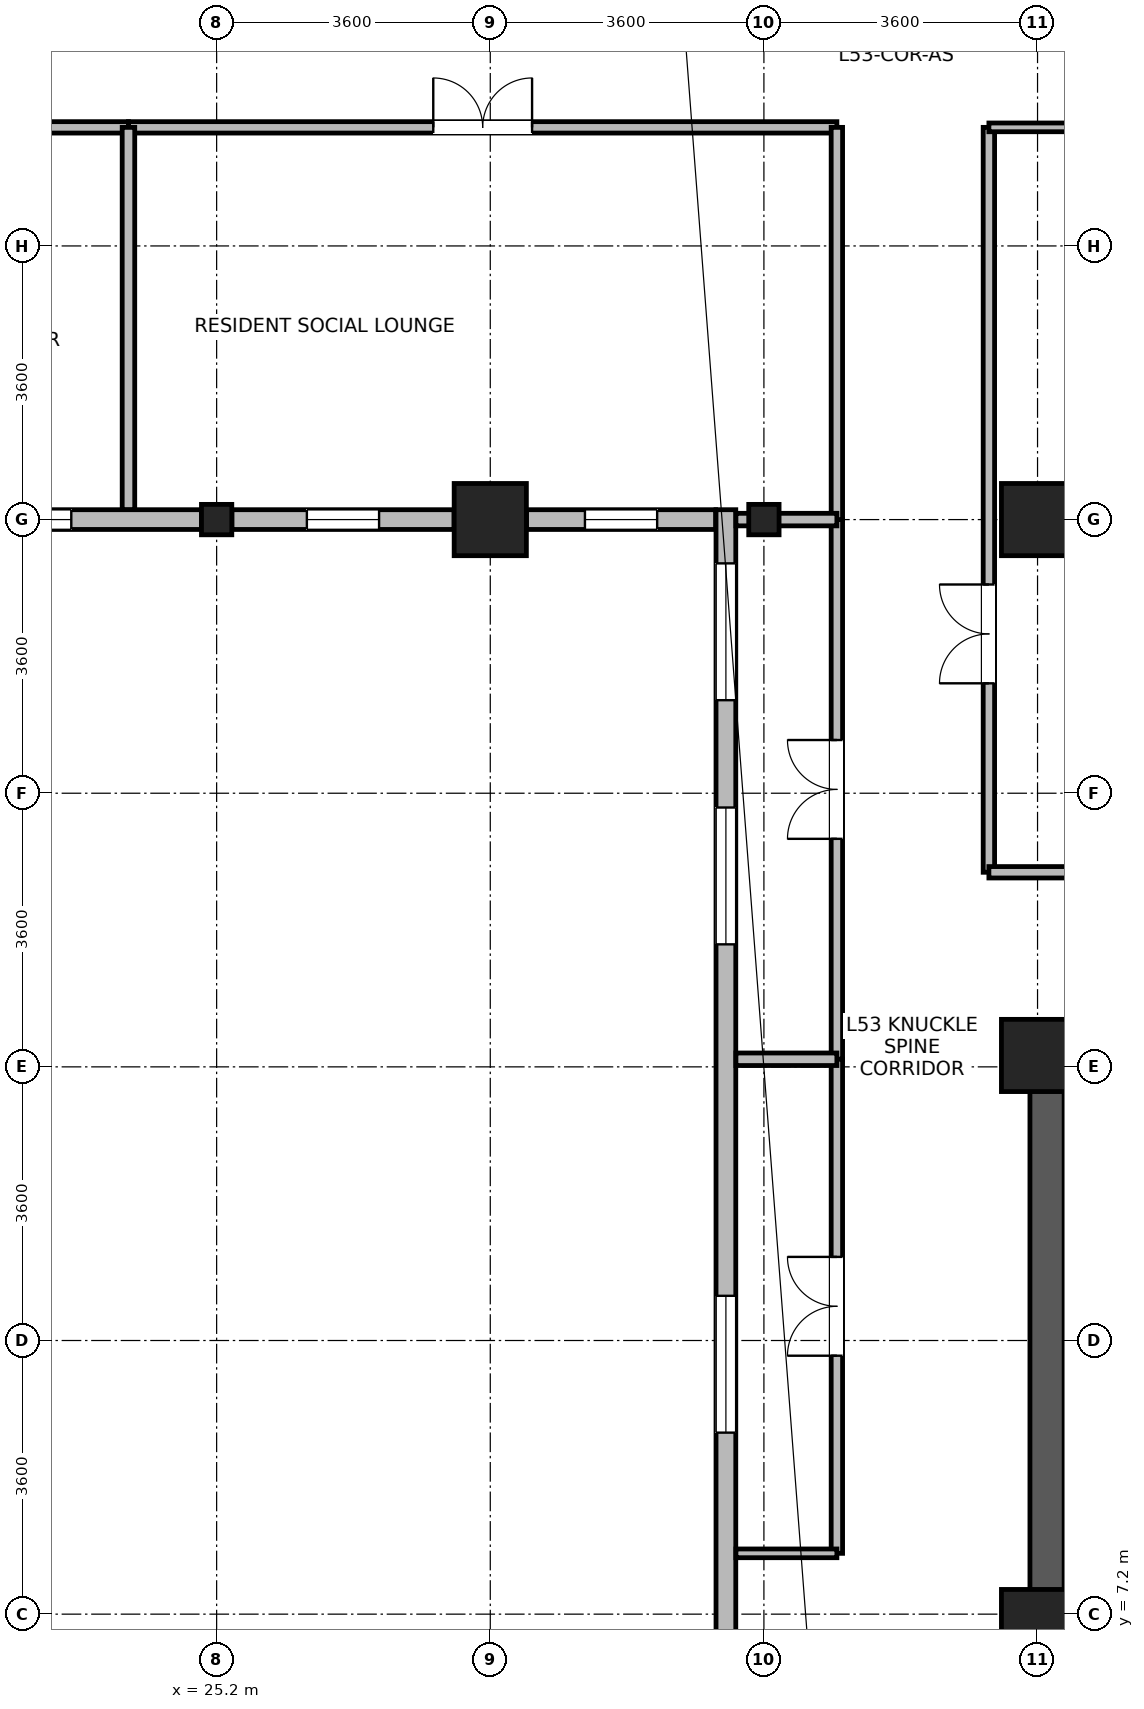
"""IFC4 building model, lengths in metres.
Left out: names, types, materials, properties, quantities, classifications, styles, units other than length and angle.
Written with IfcOpenShell. Run it as: python <this file> out.ifc"""

import sys

from ifc_helpers import new_model, si_unit, direction, frame, frame_2d, origin, origin_2d, place, context, subcontext, project, spatial, rectangle, i_section, extrude, source, transform, mapped, element, fill, save


model = new_model("IFC4")
c1 = context("Model", 3, precision=1e-05, world=origin(), true_north=direction((0.0, 1.0)))
c2 = subcontext(c1, "Body", "Model", "MODEL_VIEW")
j1 = project(units=[si_unit("LENGTHUNIT", "METRE"), si_unit("PLANEANGLEUNIT", "RADIAN")], contexts=[c1])
p1 = place(None, origin())
s1 = spatial("IfcSite", under=j1, at=p1, CompositionType="ELEMENT")
p2 = place(p1, origin())
s2 = spatial("IfcBuilding", under=s1, at=p2, CompositionType="ELEMENT")
p3 = place(p2, frame((0.0, 0.0, 209.2)))
s3 = spatial("IfcBuildingStorey", under=s2, at=p3, CompositionType="ELEMENT", Elevation=209.2)
p4 = place(p3, frame((36.125, 6.85, 0.0), z_axis=(0.0, 0.0, 1.0), x_axis=(0.0, 1.0, 0.0)))
e1 = element("IfcWall", 1, at=p4, inside=s3, PredefinedType="SHEAR", context=c2, shape_type="SweptSolid", body=[
    extrude(rectangle(XDim=7.9, YDim=0.45, at=frame_2d((3.95, 0.0))), origin(), (0.0, 0.0, 1.0), 3.47),
])
m1 = source(origin(), c2, "Body", "SweptSolid", [
    extrude(rectangle(XDim=0.95, YDim=0.95, at=origin_2d()), origin(), (0.0, 0.0, 1.0), 3.7),
])
for number, where, z_axis, x_axis in (
    (2, (28.8, 21.6, 0.0), (0.0, 0.0, 1.0), (1.0, 0.0, 0.0)),
    (3, (36.0, 21.6, 0.0), (0.0, 0.0, 1.0), (1.0, 0.0, 0.0)),
    (4, (36.0, 7.05, 0.0), (0.0, 0.0, 1.0), (1.0, 0.0, 0.0)),
    (5, (36.0, 14.55, 0.0), (0.0, 0.0, 1.0), (1.0, 0.0, 0.0)),
):
    element("IfcColumn", number, at=place(p3, frame(where, z_axis=z_axis, x_axis=x_axis)), inside=s3, PredefinedType="COLUMN", context=c2, shape_type="MappedRepresentation", body=[
        mapped(m1, transform((0.0, 0.0, 0.0), x_axis=(1.0, 0.0, 0.0), y_axis=(0.0, 1.0, 0.0), z_axis=(0.0, 0.0, 1.0), scale=1.0)),
    ])
m2 = source(origin(), c2, "Body", "SweptSolid", [
    extrude(i_section(OverallWidth=0.399, OverallDepth=0.4, WebThickness=0.017, FlangeThickness=0.023, FilletRadius=0.015, at=origin_2d()), origin(), (0.0, 0.0, 1.0), 3.7),
])
for number, where, z_axis, x_axis in (
    (6, (25.2, 21.6, 0.0), (0.0, 0.0, 1.0), (1.0, 0.0, 0.0)),
    (7, (32.4, 21.6, 0.0), (0.0, 0.0, 1.0), (1.0, 0.0, 0.0)),
):
    element("IfcColumn", number, at=place(p3, frame(where, z_axis=z_axis, x_axis=x_axis)), inside=s3, PredefinedType="COLUMN", context=c2, shape_type="MappedRepresentation", body=[
        mapped(m2, transform((0.0, 0.0, 0.0), x_axis=(1.0, 0.0, 0.0), y_axis=(0.0, 1.0, 0.0), z_axis=(0.0, 0.0, 1.0), scale=1.0)),
    ])
p5 = place(p3, frame((25.0, 21.6, 0.0), z_axis=(0.0, 0.0, 1.0), x_axis=(-1.0, 0.0, 0.0)))
e8 = element("IfcWall", 8, at=p5, inside=s3, PredefinedType="STANDARD", context=c2, shape_type="SweptSolid", body=[
    extrude(rectangle(XDim=2.924, YDim=0.26, at=frame_2d((1.462, 0.0))), origin(), (0.0, 0.0, 1.0), 3.0),
])
p6 = place(p5, frame((1.712, 0.0, 0.85)))
e9 = element("IfcOpeningElement", 9, at=p6, cuts=e8, PredefinedType="OPENING", context=c2, shape_type="SweptSolid", body=[
    extrude(rectangle(XDim=0.95, YDim=1.75, at=frame_2d((0.475, 0.875))), frame((0.0, 0.14, 0.0), z_axis=(0.0, -1.0, 0.0), x_axis=(1.0, 0.0, 0.0)), (0.0, 0.0, 1.0), 0.28),
])
p7 = place(p3, frame((28.324, 21.6, 0.0), z_axis=(0.0, 0.0, 1.0), x_axis=(-1.0, 0.0, 0.0)))
e10 = element("IfcWall", 10, at=p7, inside=s3, PredefinedType="STANDARD", context=c2, shape_type="SweptSolid", body=[
    extrude(rectangle(XDim=2.924, YDim=0.26, at=frame_2d((1.462, 0.0))), origin(), (0.0, 0.0, 1.0), 3.0),
])
p8 = place(p7, frame((0.987, 0.0, 0.85)))
e11 = element("IfcOpeningElement", 11, at=p8, cuts=e10, PredefinedType="OPENING", context=c2, shape_type="SweptSolid", body=[
    extrude(rectangle(XDim=0.95, YDim=1.75, at=frame_2d((0.475, 0.875))), frame((0.0, 0.14, 0.0), z_axis=(0.0, -1.0, 0.0), x_axis=(1.0, 0.0, 0.0)), (0.0, 0.0, 1.0), 0.28),
])
p9 = place(p3, frame((31.765, 21.6, 0.0), z_axis=(0.0, 0.0, 1.0), x_axis=(-1.0, 0.0, 0.0)))
e12 = element("IfcWall", 12, at=p9, inside=s3, PredefinedType="STANDARD", context=c2, shape_type="SweptSolid", body=[
    extrude(rectangle(XDim=2.489, YDim=0.26, at=frame_2d((1.245, 0.0))), origin(), (0.0, 0.0, 1.0), 3.0),
])
p10 = place(p9, frame((0.77, 0.0, 0.85)))
e13 = element("IfcOpeningElement", 13, at=p10, cuts=e12, PredefinedType="OPENING", context=c2, shape_type="SweptSolid", body=[
    extrude(rectangle(XDim=0.95, YDim=1.75, at=frame_2d((0.475, 0.875))), frame((0.0, 0.14, 0.0), z_axis=(0.0, -1.0, 0.0), x_axis=(1.0, 0.0, 0.0)), (0.0, 0.0, 1.0), 0.28),
])
p11 = place(p3, frame((31.9, 5.67, 0.0), z_axis=(0.0, 0.0, 1.0), x_axis=(0.0, 1.0, 0.0)))
e14 = element("IfcWall", 14, at=p11, inside=s3, PredefinedType="STANDARD", context=c2, shape_type="SweptSolid", body=[
    extrude(rectangle(XDim=16.06, YDim=0.26, at=frame_2d((8.03, 0.0))), origin(), (0.0, 0.0, 1.0), 3.45),
])
p12 = place(p11, frame((3.918, 0.0, 0.85)))
e15 = element("IfcOpeningElement", 15, at=p12, cuts=e14, PredefinedType="OPENING", context=c2, shape_type="SweptSolid", body=[
    extrude(rectangle(XDim=1.8, YDim=1.85, at=frame_2d((0.9, 0.925))), frame((0.0, 0.14, 0.0), z_axis=(0.0, -1.0, 0.0), x_axis=(1.0, 0.0, 0.0)), (0.0, 0.0, 1.0), 0.28),
])
p13 = place(p11, frame((10.342, 0.0, 0.85)))
e16 = element("IfcOpeningElement", 16, at=p13, cuts=e14, PredefinedType="OPENING", context=c2, shape_type="SweptSolid", body=[
    extrude(rectangle(XDim=1.8, YDim=1.85, at=frame_2d((0.9, 0.925))), frame((0.0, 0.14, 0.0), z_axis=(0.0, -1.0, 0.0), x_axis=(1.0, 0.0, 0.0)), (0.0, 0.0, 1.0), 0.28),
])
p14 = place(p11, frame((13.554, 0.0, 0.85)))
e17 = element("IfcOpeningElement", 17, at=p14, cuts=e14, PredefinedType="OPENING", context=c2, shape_type="SweptSolid", body=[
    extrude(rectangle(XDim=1.8, YDim=1.85, at=frame_2d((0.9, 0.925))), frame((0.0, 0.14, 0.0), z_axis=(0.0, -1.0, 0.0), x_axis=(1.0, 0.0, 0.0)), (0.0, 0.0, 1.0), 0.28),
])
p15 = place(p3, frame((35.36, 16.96, 0.0), z_axis=(0.0, 0.0, 1.0), x_axis=(0.0, 1.0, 0.0)))
e18 = element("IfcWall", 18, at=p15, inside=s3, PredefinedType="PARTITIONING", context=c2, shape_type="SweptSolid", body=[
    extrude(rectangle(XDim=9.8, YDim=0.15, at=frame_2d((4.9, 0.0))), origin(), (0.0, 0.0, 1.0), 3.45),
])
p16 = place(p15, frame((2.486, 0.0, 0.0)))
e19 = element("IfcOpeningElement", 19, at=p16, cuts=e18, PredefinedType="OPENING", context=c2, shape_type="SweptSolid", body=[
    extrude(rectangle(XDim=1.3, YDim=2.12, at=frame_2d((0.65, 1.06))), frame((0.0, 0.085, 0.0), z_axis=(0.0, -1.0, 0.0), x_axis=(1.0, 0.0, 0.0)), (0.0, 0.0, 1.0), 0.17),
])
p17 = place(p3, frame((24.04, 26.76, 0.0), z_axis=(0.0, 0.0, 1.0), x_axis=(1.0, 0.0, 0.0)))
e20 = element("IfcWall", 20, at=p17, inside=s3, PredefinedType="PARTITIONING", context=c2, shape_type="SweptSolid", body=[
    extrude(rectangle(XDim=9.32, YDim=0.15, at=frame_2d((4.66, 0.0))), origin(), (0.0, 0.0, 1.0), 3.45),
])
p18 = place(p17, frame((4.01, 0.0, 0.0)))
e21 = element("IfcOpeningElement", 21, at=p18, cuts=e20, PredefinedType="OPENING", context=c2, shape_type="SweptSolid", body=[
    extrude(rectangle(XDim=1.3, YDim=2.12, at=frame_2d((0.65, 1.06))), frame((0.0, 0.085, 0.0), z_axis=(0.0, -1.0, 0.0), x_axis=(1.0, 0.0, 0.0)), (0.0, 0.0, 1.0), 0.17),
])
p19 = place(p3, frame((35.36, 16.96, 0.0), z_axis=(0.0, 0.0, 1.0), x_axis=(1.0, 0.0, 0.0)))
e22 = element("IfcWall", 22, at=p19, inside=s3, PredefinedType="PARTITIONING", context=c2, shape_type="SweptSolid", body=[
    extrude(rectangle(XDim=9.16, YDim=0.15, at=frame_2d((4.58, 0.0))), origin(), (0.0, 0.0, 1.0), 3.45),
])
p20 = place(p3, frame((33.36, 14.5, 0.0), z_axis=(0.0, 0.0, 1.0), x_axis=(0.0, 1.0, 0.0)))
e23 = element("IfcWall", 23, at=p20, inside=s3, PredefinedType="PARTITIONING", context=c2, shape_type="SweptSolid", body=[
    extrude(rectangle(XDim=7.1, YDim=0.15, at=frame_2d((3.55, 0.0))), origin(), (0.0, 0.0, 1.0), 3.45),
])
p21 = place(p20, frame((2.9, 0.0, 0.0)))
e24 = element("IfcOpeningElement", 24, at=p21, cuts=e23, PredefinedType="OPENING", context=c2, shape_type="SweptSolid", body=[
    extrude(rectangle(XDim=1.3, YDim=2.12, at=frame_2d((0.65, 1.06))), frame((0.0, 0.085, 0.0), z_axis=(0.0, -1.0, 0.0), x_axis=(1.0, 0.0, 0.0)), (0.0, 0.0, 1.0), 0.17),
])
p22 = place(p3, frame((33.36, 8.0, 0.0), z_axis=(0.0, 0.0, 1.0), x_axis=(0.0, 1.0, 0.0)))
e25 = element("IfcWall", 25, at=p22, inside=s3, PredefinedType="PARTITIONING", context=c2, shape_type="SweptSolid", body=[
    extrude(rectangle(XDim=6.5, YDim=0.15, at=frame_2d((3.25, 0.0))), origin(), (0.0, 0.0, 1.0), 3.45),
])
p23 = place(p22, frame((2.6, 0.0, 0.0)))
e26 = element("IfcOpeningElement", 26, at=p23, cuts=e25, PredefinedType="OPENING", context=c2, shape_type="SweptSolid", body=[
    extrude(rectangle(XDim=1.3, YDim=2.12, at=frame_2d((0.65, 1.06))), frame((0.0, 0.085, 0.0), z_axis=(0.0, -1.0, 0.0), x_axis=(1.0, 0.0, 0.0)), (0.0, 0.0, 1.0), 0.17),
])
p24 = place(p3, frame((33.36, 21.6, 0.0), z_axis=(0.0, 0.0, 1.0), x_axis=(0.0, 1.0, 0.0)))
e27 = element("IfcWall", 27, at=p24, inside=s3, PredefinedType="PARTITIONING", context=c2, shape_type="SweptSolid", body=[
    extrude(rectangle(XDim=5.16, YDim=0.15, at=frame_2d((2.58, 0.0))), origin(), (0.0, 0.0, 1.0), 3.45),
])
p25 = place(p3, frame((19.8, 26.76, 0.0), z_axis=(0.0, 0.0, 1.0), x_axis=(1.0, 0.0, 0.0)))
e28 = element("IfcWall", 28, at=p25, inside=s3, PredefinedType="PARTITIONING", context=c2, shape_type="SweptSolid", body=[
    extrude(rectangle(XDim=4.24, YDim=0.15, at=frame_2d((2.12, 0.0))), origin(), (0.0, 0.0, 1.0), 3.45),
])
p26 = place(p25, frame((1.645, 0.0, 0.0)))
e29 = element("IfcOpeningElement", 29, at=p26, cuts=e28, PredefinedType="OPENING", context=c2, shape_type="SweptSolid", body=[
    extrude(rectangle(XDim=0.95, YDim=2.1, at=frame_2d((0.475, 1.05))), frame((0.0, 0.085, 0.0), z_axis=(0.0, -1.0, 0.0), x_axis=(1.0, 0.0, 0.0)), (0.0, 0.0, 1.0), 0.17),
])
p27 = place(p3, frame((35.36, 26.76, 0.0), z_axis=(0.0, 0.0, 1.0), x_axis=(1.0, 0.0, 0.0)))
e30 = element("IfcWall", 30, at=p27, inside=s3, PredefinedType="PARTITIONING", context=c2, shape_type="SweptSolid", body=[
    extrude(rectangle(XDim=9.16, YDim=0.115, at=frame_2d((4.58, 0.0))), origin(), (0.0, 0.0, 1.0), 3.45),
])
p28 = place(p3, frame((24.04, 21.732, 0.0), z_axis=(0.0, 0.0, 1.0), x_axis=(0.0, 1.0, 0.0)))
e31 = element("IfcWall", 31, at=p28, inside=s3, PredefinedType="PARTITIONING", context=c2, shape_type="SweptSolid", body=[
    extrude(rectangle(XDim=5.028, YDim=0.165, at=frame_2d((2.514, 0.0))), origin(), (0.0, 0.0, 1.0), 3.45),
])
p29 = place(p3, frame((32.032, 8.0, 0.0), z_axis=(0.0, 0.0, 1.0), x_axis=(1.0, 0.0, 0.0)))
e32 = element("IfcWall", 32, at=p29, inside=s3, PredefinedType="PARTITIONING", context=c2, shape_type="SweptSolid", body=[
    extrude(rectangle(XDim=1.328, YDim=0.115, at=frame_2d((0.664, 0.0))), origin(), (0.0, 0.0, 1.0), 3.45),
])
p30 = place(p3, frame((32.032, 14.5, 0.0), z_axis=(0.0, 0.0, 1.0), x_axis=(1.0, 0.0, 0.0)))
e33 = element("IfcWall", 33, at=p30, inside=s3, PredefinedType="PARTITIONING", context=c2, shape_type="SweptSolid", body=[
    extrude(rectangle(XDim=1.328, YDim=0.165, at=frame_2d((0.664, 0.0))), origin(), (0.0, 0.0, 1.0), 3.45),
])
p31 = place(p3, frame((32.032, 21.6, 0.0), z_axis=(0.0, 0.0, 1.0), x_axis=(1.0, 0.0, 0.0)))
e34 = element("IfcWall", 34, at=p31, inside=s3, PredefinedType="PARTITIONING", context=c2, shape_type="SweptSolid", body=[
    extrude(rectangle(XDim=1.328, YDim=0.165, at=frame_2d((0.664, 0.0))), origin(), (0.0, 0.0, 1.0), 3.0),
])
p32 = place(p6, origin())
e35 = element("IfcWindow", 35, at=p32, inside=s3, PartitioningType="SINGLE_PANEL", PredefinedType="WINDOW", context=c2, shape_type="SweptSolid", body=[
    extrude(rectangle(XDim=0.95, YDim=1.75, at=frame_2d((0.475, 0.875))), frame((0.0, 0.03, 0.0), z_axis=(0.0, -1.0, 0.0), x_axis=(1.0, 0.0, 0.0)), (0.0, 0.0, 1.0), 0.06),
])
fill(e9, e35)
p33 = place(p8, origin())
e36 = element("IfcWindow", 36, at=p33, inside=s3, PartitioningType="SINGLE_PANEL", PredefinedType="WINDOW", context=c2, shape_type="SweptSolid", body=[
    extrude(rectangle(XDim=0.95, YDim=1.75, at=frame_2d((0.475, 0.875))), frame((0.0, 0.03, 0.0), z_axis=(0.0, -1.0, 0.0), x_axis=(1.0, 0.0, 0.0)), (0.0, 0.0, 1.0), 0.06),
])
fill(e11, e36)
p34 = place(p10, origin())
e37 = element("IfcWindow", 37, at=p34, inside=s3, PartitioningType="SINGLE_PANEL", PredefinedType="WINDOW", context=c2, shape_type="SweptSolid", body=[
    extrude(rectangle(XDim=0.95, YDim=1.75, at=frame_2d((0.475, 0.875))), frame((0.0, 0.03, 0.0), z_axis=(0.0, -1.0, 0.0), x_axis=(1.0, 0.0, 0.0)), (0.0, 0.0, 1.0), 0.06),
])
fill(e13, e37)
p35 = place(p12, origin())
e38 = element("IfcWindow", 38, at=p35, inside=s3, PartitioningType="SINGLE_PANEL", PredefinedType="WINDOW", context=c2, shape_type="SweptSolid", body=[
    extrude(rectangle(XDim=1.8, YDim=1.85, at=frame_2d((0.9, 0.925))), frame((0.0, 0.03, 0.0), z_axis=(0.0, -1.0, 0.0), x_axis=(1.0, 0.0, 0.0)), (0.0, 0.0, 1.0), 0.06),
])
fill(e15, e38)
p36 = place(p13, origin())
e39 = element("IfcWindow", 39, at=p36, inside=s3, PartitioningType="SINGLE_PANEL", PredefinedType="WINDOW", context=c2, shape_type="SweptSolid", body=[
    extrude(rectangle(XDim=1.8, YDim=1.85, at=frame_2d((0.9, 0.925))), frame((0.0, 0.03, 0.0), z_axis=(0.0, -1.0, 0.0), x_axis=(1.0, 0.0, 0.0)), (0.0, 0.0, 1.0), 0.06),
])
fill(e16, e39)
p37 = place(p14, origin())
e40 = element("IfcWindow", 40, at=p37, inside=s3, PartitioningType="SINGLE_PANEL", PredefinedType="WINDOW", context=c2, shape_type="SweptSolid", body=[
    extrude(rectangle(XDim=1.8, YDim=1.85, at=frame_2d((0.9, 0.925))), frame((0.0, 0.03, 0.0), z_axis=(0.0, -1.0, 0.0), x_axis=(1.0, 0.0, 0.0)), (0.0, 0.0, 1.0), 0.06),
])
fill(e17, e40)
p38 = place(p16, origin())
e41 = element("IfcDoor", 41, at=p38, inside=s3, OperationType="DOUBLE_DOOR_SINGLE_SWING", PredefinedType="DOOR", context=c2, shape_type="SweptSolid", body=[
    extrude(rectangle(XDim=1.3, YDim=2.12, at=frame_2d((0.65, 1.06))), frame((0.0, 0.025, 0.0), z_axis=(0.0, -1.0, 0.0), x_axis=(1.0, 0.0, 0.0)), (0.0, 0.0, 1.0), 0.05),
])
fill(e19, e41)
p39 = place(p18, origin())
e42 = element("IfcDoor", 42, at=p39, inside=s3, OperationType="DOUBLE_DOOR_SINGLE_SWING", PredefinedType="DOOR", context=c2, shape_type="SweptSolid", body=[
    extrude(rectangle(XDim=1.3, YDim=2.12, at=frame_2d((0.65, 1.06))), frame((0.0, 0.025, 0.0), z_axis=(0.0, -1.0, 0.0), x_axis=(1.0, 0.0, 0.0)), (0.0, 0.0, 1.0), 0.05),
])
fill(e21, e42)
p40 = place(p21, origin())
e43 = element("IfcDoor", 43, at=p40, inside=s3, OperationType="DOUBLE_DOOR_SINGLE_SWING", PredefinedType="DOOR", context=c2, shape_type="SweptSolid", body=[
    extrude(rectangle(XDim=1.3, YDim=2.12, at=frame_2d((0.65, 1.06))), frame((0.0, 0.025, 0.0), z_axis=(0.0, -1.0, 0.0), x_axis=(1.0, 0.0, 0.0)), (0.0, 0.0, 1.0), 0.05),
])
fill(e24, e43)
p41 = place(p23, origin())
e44 = element("IfcDoor", 44, at=p41, inside=s3, OperationType="DOUBLE_DOOR_SINGLE_SWING", PredefinedType="DOOR", context=c2, shape_type="SweptSolid", body=[
    extrude(rectangle(XDim=1.3, YDim=2.12, at=frame_2d((0.65, 1.06))), frame((0.0, 0.025, 0.0), z_axis=(0.0, -1.0, 0.0), x_axis=(1.0, 0.0, 0.0)), (0.0, 0.0, 1.0), 0.05),
])
fill(e26, e44)
save(model, sys.argv[1])
